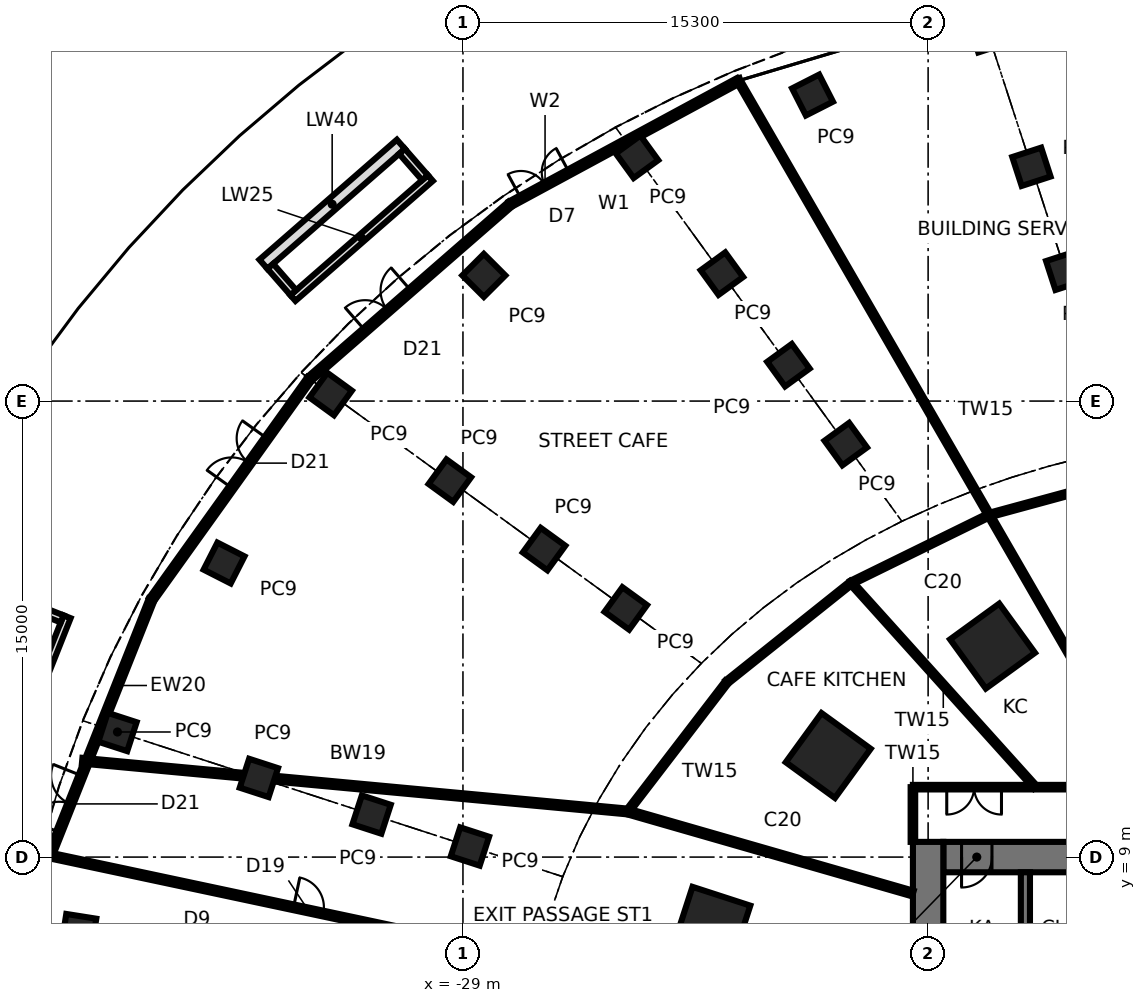
"""IFC4 building model, lengths in metres.
Left out: names, types, materials, properties, quantities, classifications, styles, units other than length and angle.
Written with IfcOpenShell. Run it as: python <this file> out.ifc"""

import sys

from ifc_helpers import new_model, si_unit, direction, frame, frame_2d, origin, origin_2d, place, context, subcontext, project, spatial, rectangle, extrude, element, fill, save


model = new_model("IFC4")
c1 = context("Model", 3, precision=1e-05, world=origin(), true_north=direction((0.0, 1.0)))
c2 = subcontext(c1, "Body", "Model", "MODEL_VIEW")
j1 = project(units=[si_unit("LENGTHUNIT", "METRE"), si_unit("PLANEANGLEUNIT", "RADIAN")], contexts=[c1])
p1 = place(None, origin())
s1 = spatial("IfcSite", under=j1, at=p1, CompositionType="ELEMENT")
p2 = place(p1, origin())
s2 = spatial("IfcBuilding", under=s1, at=p2, CompositionType="ELEMENT")
p3 = place(p2, origin())
s3 = spatial("IfcBuildingStorey", under=s2, at=p3, CompositionType="ELEMENT", Elevation=0.0)
for number, where, z_axis, x_axis in (
    (1, (-11.581, 15.94, 0.0), (0.0, 0.0, 1.0), (-0.588, 0.809, 0.0)),
    (2, (-16.986, 12.341, 0.0), (0.0, 0.0, 1.0), (-0.809, 0.588, 0.0)),
    (3, (-20.808, 6.761, 0.0), (0.0, 0.0, 1.0), (-0.951, 0.309, 0.0)),
):
    element("IfcColumn", number, at=place(p3, frame(where, z_axis=z_axis, x_axis=x_axis)), inside=s3, PredefinedType="COLUMN", context=c2, shape_type="SweptSolid", body=[
        extrude(rectangle(XDim=2.0, YDim=2.0, at=origin_2d()), origin(), (0.0, 0.0, 1.0), 5.6),
    ])
for number, where, z_axis, x_axis in (
    (4, (-11.729, 36.097, 0.0), (0.0, 0.0, 1.0), (-0.309, 0.951, 0.0)),
    (5, (-17.502, 34.066, 0.0), (0.0, 0.0, 1.0), (-0.454, 0.891, 0.0)),
    (6, (-23.275, 32.035, 0.0), (0.0, 0.0, 1.0), (-0.588, 0.809, 0.0)),
    (7, (-28.313, 28.133, 0.0), (0.0, 0.0, 1.0), (-0.707, 0.707, 0.0)),
    (8, (-33.352, 24.232, 0.0), (0.0, 0.0, 1.0), (-0.809, 0.588, 0.0)),
    (9, (-36.858, 18.673, 0.0), (0.0, 0.0, 1.0), (-0.891, 0.454, 0.0)),
    (10, (-40.363, 13.115, 0.0), (0.0, 0.0, 1.0), (-0.951, 0.309, 0.0)),
    (11, (-41.632, 6.557, 0.0), (0.0, 0.0, 1.0), (-0.988, 0.156, 0.0)),
    (12, (-10.302, 31.706, 0.0), (0.0, 0.0, 1.0), (-0.309, 0.951, 0.0)),
    (13, (-20.483, 28.192, 0.0), (0.0, 0.0, 1.0), (-0.588, 0.809, 0.0)),
    (14, (-29.431, 21.383, 0.0), (0.0, 0.0, 1.0), (-0.809, 0.588, 0.0)),
    (15, (-35.712, 11.604, 0.0), (0.0, 0.0, 1.0), (-0.951, 0.309, 0.0)),
    (16, (-9.19, 28.285, 0.0), (0.0, 0.0, 1.0), (-0.309, 0.951, 0.0)),
    (17, (-18.294, 25.18, 0.0), (0.0, 0.0, 1.0), (-0.588, 0.809, 0.0)),
    (18, (-26.332, 19.131, 0.0), (0.0, 0.0, 1.0), (-0.809, 0.588, 0.0)),
    (19, (-32.005, 10.399, 0.0), (0.0, 0.0, 1.0), (-0.951, 0.309, 0.0)),
    (20, (-16.409, 22.584, 0.0), (0.0, 0.0, 1.0), (-0.588, 0.809, 0.0)),
    (21, (-23.645, 17.179, 0.0), (0.0, 0.0, 1.0), (-0.809, 0.588, 0.0)),
    (22, (-28.77, 9.348, 0.0), (0.0, 0.0, 1.0), (-0.951, 0.309, 0.0)),
):
    element("IfcColumn", number, at=place(p3, frame(where, z_axis=z_axis, x_axis=x_axis)), inside=s3, PredefinedType="COLUMN", context=c2, shape_type="SweptSolid", body=[
        extrude(rectangle(XDim=1.0, YDim=1.0, at=origin_2d()), origin(), (0.0, 0.0, 1.0), 5.6),
    ])
p4 = place(p3, frame((13.2, 9.0, 0.0), z_axis=(0.0, 0.0, 1.0), x_axis=(-1.0, 0.0, 0.0)))
e23 = element("IfcWall", 23, at=p4, inside=s3, PredefinedType="SHEAR", context=c2, shape_type="SweptSolid", body=[
    extrude(rectangle(XDim=26.4, YDim=1.0, at=frame_2d((13.2, 0.0))), origin(), (0.0, 0.0, 1.0), 5.6),
])
p5 = place(p4, frame((2.65, 0.0, 0.0)))
e24 = element("IfcOpeningElement", 24, at=p5, cuts=e23, PredefinedType="OPENING", context=c2, shape_type="SweptSolid", body=[
    extrude(rectangle(XDim=0.9, YDim=2.1, at=frame_2d((0.45, 1.05))), frame((0.0, 0.51, 0.0), z_axis=(0.0, -1.0, 0.0), x_axis=(1.0, 0.0, 0.0)), (0.0, 0.0, 1.0), 1.02),
])
p6 = place(p4, frame((9.5, 0.0, 0.0)))
e25 = element("IfcOpeningElement", 25, at=p6, cuts=e23, PredefinedType="OPENING", context=c2, shape_type="SweptSolid", body=[
    extrude(rectangle(XDim=0.9, YDim=2.1, at=frame_2d((0.45, 1.05))), frame((0.0, 0.51, 0.0), z_axis=(0.0, -1.0, 0.0), x_axis=(1.0, 0.0, 0.0)), (0.0, 0.0, 1.0), 1.02),
])
p7 = place(p4, frame((16.0, 0.0, 0.0)))
e26 = element("IfcOpeningElement", 26, at=p7, cuts=e23, PredefinedType="OPENING", context=c2, shape_type="SweptSolid", body=[
    extrude(rectangle(XDim=0.9, YDim=2.1, at=frame_2d((0.45, 1.05))), frame((0.0, 0.51, 0.0), z_axis=(0.0, -1.0, 0.0), x_axis=(1.0, 0.0, 0.0)), (0.0, 0.0, 1.0), 1.02),
])
p8 = place(p4, frame((21.25, 0.0, 0.0)))
e27 = element("IfcOpeningElement", 27, at=p8, cuts=e23, PredefinedType="OPENING", context=c2, shape_type="SweptSolid", body=[
    extrude(rectangle(XDim=0.9, YDim=2.1, at=frame_2d((0.45, 1.05))), frame((0.0, 0.51, 0.0), z_axis=(0.0, -1.0, 0.0), x_axis=(1.0, 0.0, 0.0)), (0.0, 0.0, 1.0), 1.02),
])
p9 = place(p4, frame((24.8, 0.0, 0.0)))
e28 = element("IfcOpeningElement", 28, at=p9, cuts=e23, PredefinedType="OPENING", context=c2, shape_type="SweptSolid", body=[
    extrude(rectangle(XDim=1.0, YDim=2.1, at=frame_2d((0.5, 1.05))), frame((0.0, 0.51, 0.0), z_axis=(0.0, -1.0, 0.0), x_axis=(1.0, 0.0, 0.0)), (0.0, 0.0, 1.0), 1.02),
])
p10 = place(p3, frame((-13.7, 9.5, 0.0), z_axis=(0.0, 0.0, 1.0), x_axis=(0.0, -1.0, 0.0)))
e29 = element("IfcWall", 29, at=p10, inside=s3, PredefinedType="SHEAR", context=c2, shape_type="SweptSolid", body=[
    extrude(rectangle(XDim=19.0, YDim=1.0, at=frame_2d((9.5, 0.0))), origin(), (0.0, 0.0, 1.0), 5.6),
])
p11 = place(p10, frame((8.6, 0.0, 0.0)))
e30 = element("IfcOpeningElement", 30, at=p11, cuts=e29, PredefinedType="OPENING", context=c2, shape_type="SweptSolid", body=[
    extrude(rectangle(XDim=1.8, YDim=2.4, at=frame_2d((0.9, 1.2))), frame((0.0, 0.51, 0.0), z_axis=(0.0, -1.0, 0.0), x_axis=(1.0, 0.0, 0.0)), (0.0, 0.0, 1.0), 1.02),
])
p12 = place(p10, frame((5.3, 0.0, 0.0)))
e31 = element("IfcOpeningElement", 31, at=p12, cuts=e29, PredefinedType="OPENING", context=c2, shape_type="SweptSolid", body=[
    extrude(rectangle(XDim=1.0, YDim=2.1, at=frame_2d((0.5, 1.05))), frame((0.0, 0.51, 0.0), z_axis=(0.0, -1.0, 0.0), x_axis=(1.0, 0.0, 0.0)), (0.0, 0.0, 1.0), 1.02),
])
p13 = place(p3, frame((-10.5, 4.75, 0.0), z_axis=(0.0, 0.0, 1.0), x_axis=(0.0, 1.0, 0.0)))
e32 = element("IfcWall", 32, at=p13, inside=s3, PredefinedType="SHEAR", context=c2, shape_type="SweptSolid", body=[
    extrude(rectangle(XDim=3.75, YDim=0.3, at=frame_2d((1.875, 0.0))), origin(), (0.0, 0.0, 1.0), 5.6),
])
p14 = place(p3, frame((-19.94, 34.537, 0.0), z_axis=(0.0, 0.0, 1.0), x_axis=(-0.879579965321, -0.475751074204, 0.0)))
e33 = element("IfcWall", 33, at=p14, inside=s3, PredefinedType="SOLIDWALL", context=c2, shape_type="SweptSolid", body=[
    extrude(rectangle(XDim=8.531, YDim=0.2, at=frame_2d((4.265, 0.0))), origin(), (0.0, 0.0, 1.0), 5.4),
])
p15 = place(p14, frame((6.33, 0.0, 0.0)))
e34 = element("IfcOpeningElement", 34, at=p15, cuts=e33, PredefinedType="OPENING", context=c2, shape_type="SweptSolid", body=[
    extrude(rectangle(XDim=1.8, YDim=2.7, at=frame_2d((0.9, 1.35))), frame((0.0, 0.11, 0.0), z_axis=(0.0, -1.0, 0.0), x_axis=(1.0, 0.0, 0.0)), (0.0, 0.0, 1.0), 0.22),
])
p16 = place(p14, frame((4.93, 0.0, 0.3)))
e35 = element("IfcOpeningElement", 35, at=p16, cuts=e33, PredefinedType="OPENING", context=c2, shape_type="SweptSolid", body=[
    extrude(rectangle(XDim=1.2, YDim=2.4, at=frame_2d((0.6, 1.2))), frame((0.0, 0.11, 0.0), z_axis=(0.0, -1.0, 0.0), x_axis=(1.0, 0.0, 0.0)), (0.0, 0.0, 1.0), 0.22),
])
p17 = place(p14, frame((6.33, 0.0, 3.0)))
e36 = element("IfcOpeningElement", 36, at=p17, cuts=e33, PredefinedType="OPENING", context=c2, shape_type="SweptSolid", body=[
    extrude(rectangle(XDim=1.8, YDim=0.9, at=frame_2d((0.9, 0.45))), frame((0.0, 0.11, 0.0), z_axis=(0.0, -1.0, 0.0), x_axis=(1.0, 0.0, 0.0)), (0.0, 0.0, 1.0), 0.22),
])
p18 = place(p3, frame((-27.443, 30.479, 0.0), z_axis=(0.0, 0.0, 1.0), x_axis=(-0.753966562676, -0.656912796623, 0.0)))
e37 = element("IfcWall", 37, at=p18, inside=s3, PredefinedType="SOLIDWALL", context=c2, shape_type="SweptSolid", body=[
    extrude(rectangle(XDim=8.749, YDim=0.2, at=frame_2d((4.375, 0.0))), origin(), (0.0, 0.0, 1.0), 5.4),
])
p19 = place(p18, frame((4.333, 0.0, 0.0)))
e38 = element("IfcOpeningElement", 38, at=p19, cuts=e37, PredefinedType="OPENING", context=c2, shape_type="SweptSolid", body=[
    extrude(rectangle(XDim=2.0, YDim=2.7, at=frame_2d((1.0, 1.35))), frame((0.0, 0.11, 0.0), z_axis=(0.0, -1.0, 0.0), x_axis=(1.0, 0.0, 0.0)), (0.0, 0.0, 1.0), 0.22),
])
p20 = place(p3, frame((-34.04, 24.731, 0.0), z_axis=(0.0, 0.0, 1.0), x_axis=(-0.582334103946, -0.81294956263, 0.0)))
e39 = element("IfcWall", 39, at=p20, inside=s3, PredefinedType="SOLIDWALL", context=c2, shape_type="SweptSolid", body=[
    extrude(rectangle(XDim=8.931, YDim=0.2, at=frame_2d((4.465, 0.0))), origin(), (0.0, 0.0, 1.0), 5.4),
])
p21 = place(p20, frame((2.41, 0.0, 0.0)))
e40 = element("IfcOpeningElement", 40, at=p21, cuts=e39, PredefinedType="OPENING", context=c2, shape_type="SweptSolid", body=[
    extrude(rectangle(XDim=2.0, YDim=2.7, at=frame_2d((1.0, 1.35))), frame((0.0, 0.11, 0.0), z_axis=(0.0, -1.0, 0.0), x_axis=(1.0, 0.0, 0.0)), (0.0, 0.0, 1.0), 0.22),
])
p22 = place(p3, frame((-39.24, 17.471, 0.0), z_axis=(0.0, 0.0, 1.0), x_axis=(-0.369754749145, -0.929129391143, 0.0)))
e41 = element("IfcWall", 41, at=p22, inside=s3, PredefinedType="SOLIDWALL", context=c2, shape_type="SweptSolid", body=[
    extrude(rectangle(XDim=9.06, YDim=0.2, at=frame_2d((4.53, 0.0))), origin(), (0.0, 0.0, 1.0), 5.4),
])
p23 = place(p22, frame((6.235, 0.0, 0.0)))
e42 = element("IfcOpeningElement", 42, at=p23, cuts=e41, PredefinedType="OPENING", context=c2, shape_type="SweptSolid", body=[
    extrude(rectangle(XDim=2.0, YDim=2.7, at=frame_2d((1.0, 1.35))), frame((0.0, 0.11, 0.0), z_axis=(0.0, -1.0, 0.0), x_axis=(1.0, 0.0, 0.0)), (0.0, 0.0, 1.0), 0.22),
])
p24 = place(p3, frame((-30.072, 31.336, -0.15), z_axis=(0.0, 0.0, 1.0), x_axis=(-0.753337421731, -0.657634190884, 0.0)))
e43 = element("IfcWall", 43, at=p24, inside=s3, PredefinedType="SOLIDWALL", context=c2, shape_type="SweptSolid", body=[
    extrude(rectangle(XDim=6.0, YDim=0.25, at=frame_2d((3.0, 0.0))), origin(), (0.0, 0.0, 1.0), 0.6),
])
p25 = place(p3, frame((-31.042, 32.447, -0.15), z_axis=(0.0, 0.0, 1.0), x_axis=(-0.753337421731, -0.657634190884, 0.0)))
e44 = element("IfcWall", 44, at=p25, inside=s3, PredefinedType="SOLIDWALL", context=c2, shape_type="SweptSolid", body=[
    extrude(rectangle(XDim=6.0, YDim=0.4, at=frame_2d((3.0, 0.0))), origin(), (0.0, 0.0, 1.0), 0.6),
])
p26 = place(p3, frame((-30.248, 31.348, -0.15), z_axis=(0.0, 0.0, 1.0), x_axis=(-0.657617494146, 0.753351997006, 0.0)))
e45 = element("IfcWall", 45, at=p26, inside=s3, PredefinedType="SOLIDWALL", context=c2, shape_type="SweptSolid", body=[
    extrude(rectangle(XDim=1.15, YDim=0.25, at=frame_2d((0.575, 0.0))), origin(), (0.0, 0.0, 1.0), 0.6),
])
p27 = place(p3, frame((-34.58, 27.567, -0.15), z_axis=(0.0, 0.0, 1.0), x_axis=(-0.657602180016, 0.753365364772, 0.0)))
e46 = element("IfcWall", 46, at=p27, inside=s3, PredefinedType="SOLIDWALL", context=c2, shape_type="SweptSolid", body=[
    extrude(rectangle(XDim=1.15, YDim=0.25, at=frame_2d((0.575, 0.0))), origin(), (0.0, 0.0, 1.0), 0.6),
])
p28 = place(p3, frame((-42.021, 16.905, -0.15), z_axis=(0.0, 0.0, 1.0), x_axis=(-0.369263988393, -0.929324543352, 0.0)))
e47 = element("IfcWall", 47, at=p28, inside=s3, PredefinedType="SOLIDWALL", context=c2, shape_type="SweptSolid", body=[
    extrude(rectangle(XDim=6.0, YDim=0.25, at=frame_2d((3.0, 0.0))), origin(), (0.0, 0.0, 1.0), 0.6),
])
p29 = place(p3, frame((-42.183, 16.835, -0.15), z_axis=(0.0, 0.0, 1.0), x_axis=(-0.92933811404, 0.369229833291, 0.0)))
e48 = element("IfcWall", 48, at=p29, inside=s3, PredefinedType="SOLIDWALL", context=c2, shape_type="SweptSolid", body=[
    extrude(rectangle(XDim=1.15, YDim=0.25, at=frame_2d((0.575, 0.0))), origin(), (0.0, 0.0, 1.0), 0.6),
])
p30 = place(p3, frame((-6.995, 21.528, 0.0), z_axis=(0.0, 0.0, 1.0), x_axis=(-0.964877176163, -0.26270141781, 0.0)))
e49 = element("IfcWall", 49, at=p30, inside=s3, PredefinedType="PARTITIONING", context=c2, shape_type="SweptSolid", body=[
    extrude(rectangle(XDim=4.867, YDim=0.15, at=frame_2d((2.434, 0.0))), origin(), (0.0, 0.0, 1.0), 5.4),
])
p31 = place(p3, frame((-6.524, 11.3, 0.0), z_axis=(0.0, 0.0, 1.0), x_axis=(-0.499999476762, 0.866025705876, 0.0)))
e50 = element("IfcWall", 50, at=p31, inside=s3, PredefinedType="PARTITIONING", context=c2, shape_type="SweptSolid", body=[
    extrude(rectangle(XDim=26.751, YDim=0.15, at=frame_2d((13.376, 0.0))), origin(), (0.0, 0.0, 1.0), 5.4),
])
p32 = place(p3, frame((-1.992, 11.3, 0.0), z_axis=(0.0, 0.0, 1.0), x_axis=(-1.0, 0.0, 0.0)))
e51 = element("IfcWall", 51, at=p32, inside=s3, PredefinedType="PARTITIONING", context=c2, shape_type="SweptSolid", body=[
    extrude(rectangle(XDim=12.208, YDim=0.15, at=frame_2d((6.104, 0.0))), origin(), (0.0, 0.0, 1.0), 5.4),
])
p33 = place(p32, frame((5.782, 0.0, 0.0)))
e52 = element("IfcOpeningElement", 52, at=p33, cuts=e51, PredefinedType="OPENING", context=c2, shape_type="SweptSolid", body=[
    extrude(rectangle(XDim=1.2, YDim=2.4, at=frame_2d((0.6, 1.2))), frame((0.0, 0.085, 0.0), z_axis=(0.0, -1.0, 0.0), x_axis=(1.0, 0.0, 0.0)), (0.0, 0.0, 1.0), 0.17),
])
p34 = place(p32, frame((9.295, 0.0, 0.0)))
e53 = element("IfcOpeningElement", 53, at=p34, cuts=e51, PredefinedType="OPENING", context=c2, shape_type="SweptSolid", body=[
    extrude(rectangle(XDim=1.8, YDim=2.4, at=frame_2d((0.9, 1.2))), frame((0.0, 0.085, 0.0), z_axis=(0.0, -1.0, 0.0), x_axis=(1.0, 0.0, 0.0)), (0.0, 0.0, 1.0), 0.17),
])
p35 = place(p3, frame((-11.691, 20.25, 0.0), z_axis=(0.0, 0.0, 1.0), x_axis=(-0.897697488604, -0.440612322744, 0.0)))
e54 = element("IfcWall", 54, at=p35, inside=s3, PredefinedType="PARTITIONING", context=c2, shape_type="SweptSolid", body=[
    extrude(rectangle(XDim=5.054, YDim=0.15, at=frame_2d((2.527, 0.0))), origin(), (0.0, 0.0, 1.0), 5.4),
])
p36 = place(p3, frame((-10.175, 11.3, 0.0), z_axis=(0.0, 0.0, 1.0), x_axis=(-0.669137674556, 0.743138461183, 0.0)))
e55 = element("IfcWall", 55, at=p36, inside=s3, PredefinedType="PARTITIONING", context=c2, shape_type="SweptSolid", body=[
    extrude(rectangle(XDim=9.046, YDim=0.15, at=frame_2d((4.523, 0.0))), origin(), (0.0, 0.0, 1.0), 5.4),
])
p37 = place(p3, frame((-16.228, 18.023, 0.0), z_axis=(0.0, 0.0, 1.0), x_axis=(-0.781542390833, -0.623852138997, 0.0)))
e56 = element("IfcWall", 56, at=p37, inside=s3, PredefinedType="PARTITIONING", context=c2, shape_type="SweptSolid", body=[
    extrude(rectangle(XDim=5.23, YDim=0.15, at=frame_2d((2.615, 0.0))), origin(), (0.0, 0.0, 1.0), 5.4),
])
p38 = place(p3, frame((-14.2, 11.3, 0.0), z_axis=(0.0, 0.0, 1.0), x_axis=(0.0, -1.0, 0.0)))
e57 = element("IfcWall", 57, at=p38, inside=s3, PredefinedType="PARTITIONING", context=c2, shape_type="SweptSolid", body=[
    extrude(rectangle(XDim=1.8, YDim=0.15, at=frame_2d((0.9, 0.0))), origin(), (0.0, 0.0, 1.0), 5.4),
])
p39 = place(p3, frame((-20.315, 14.76, 0.0), z_axis=(0.0, 0.0, 1.0), x_axis=(-0.608593816375, -0.793481925862, 0.0)))
e58 = element("IfcWall", 58, at=p39, inside=s3, PredefinedType="PARTITIONING", context=c2, shape_type="SweptSolid", body=[
    extrude(rectangle(XDim=5.369, YDim=0.15, at=frame_2d((2.685, 0.0))), origin(), (0.0, 0.0, 1.0), 5.4),
])
p40 = place(p3, frame((-14.2, 7.8, 0.0), z_axis=(0.0, 0.0, 1.0), x_axis=(-0.961010848489, 0.27651066722, 0.0)))
e59 = element("IfcWall", 59, at=p40, inside=s3, PredefinedType="SOLIDWALL", context=c2, shape_type="SweptSolid", body=[
    extrude(rectangle(XDim=9.763, YDim=0.19, at=frame_2d((4.882, 0.0))), origin(), (0.0, 0.0, 1.0), 5.4),
])
p41 = place(p3, frame((-23.583, 10.5, 0.0), z_axis=(0.0, 0.0, 1.0), x_axis=(-0.995692930354, 0.092712396381, 0.0)))
e60 = element("IfcWall", 60, at=p41, inside=s3, PredefinedType="SOLIDWALL", context=c2, shape_type="SweptSolid", body=[
    extrude(rectangle(XDim=18.02, YDim=0.19, at=frame_2d((9.01, 0.0))), origin(), (0.0, 0.0, 1.0), 4.45),
])
p42 = place(p3, frame((-42.512, 9.036, 0.0), z_axis=(0.0, 0.0, 1.0), x_axis=(0.978148538657, -0.207907278186, 0.0)))
e61 = element("IfcWall", 61, at=p42, inside=s3, PredefinedType="SOLIDWALL", context=c2, shape_type="SweptSolid", body=[
    extrude(rectangle(XDim=28.945, YDim=0.19, at=frame_2d((14.472, 0.0))), origin(), (0.0, 0.0, 1.0), 5.4),
])
p43 = place(p42, frame((8.116, 0.0, 0.0)))
e62 = element("IfcOpeningElement", 62, at=p43, cuts=e61, PredefinedType="OPENING", context=c2, shape_type="SweptSolid", body=[
    extrude(rectangle(XDim=1.0, YDim=2.1, at=frame_2d((0.5, 1.05))), frame((0.0, 0.105, 0.0), z_axis=(0.0, -1.0, 0.0), x_axis=(1.0, 0.0, 0.0)), (0.0, 0.0, 1.0), 0.21),
])
p44 = place(p15, frame((1.8, 0.0, 0.0), z_axis=(0.0, 0.0, 1.0), x_axis=(-1.0, 0.0, 0.0)))
e63 = element("IfcDoor", 63, at=p44, inside=s3, OperationType="DOUBLE_DOOR_SINGLE_SWING", PredefinedType="DOOR", context=c2, shape_type="SweptSolid", body=[
    extrude(rectangle(XDim=1.8, YDim=2.7, at=frame_2d((0.9, 1.35))), frame((0.0, 0.025, 0.0), z_axis=(0.0, -1.0, 0.0), x_axis=(1.0, 0.0, 0.0)), (0.0, 0.0, 1.0), 0.05),
])
fill(e34, e63)
p45 = place(p16, origin())
e64 = element("IfcWindow", 64, at=p45, inside=s3, PartitioningType="SINGLE_PANEL", PredefinedType="WINDOW", context=c2, shape_type="SweptSolid", body=[
    extrude(rectangle(XDim=1.2, YDim=2.4, at=frame_2d((0.6, 1.2))), frame((0.0, 0.03, 0.0), z_axis=(0.0, -1.0, 0.0), x_axis=(1.0, 0.0, 0.0)), (0.0, 0.0, 1.0), 0.06),
])
fill(e35, e64)
p46 = place(p17, origin())
e65 = element("IfcWindow", 65, at=p46, inside=s3, PartitioningType="SINGLE_PANEL", PredefinedType="WINDOW", context=c2, shape_type="SweptSolid", body=[
    extrude(rectangle(XDim=1.8, YDim=0.9, at=frame_2d((0.9, 0.45))), frame((0.0, 0.03, 0.0), z_axis=(0.0, -1.0, 0.0), x_axis=(1.0, 0.0, 0.0)), (0.0, 0.0, 1.0), 0.06),
])
fill(e36, e65)
p47 = place(p19, frame((2.0, 0.0, 0.0), z_axis=(0.0, 0.0, 1.0), x_axis=(-1.0, 0.0, 0.0)))
e66 = element("IfcDoor", 66, at=p47, inside=s3, OperationType="DOUBLE_DOOR_SINGLE_SWING", PredefinedType="DOOR", context=c2, shape_type="SweptSolid", body=[
    extrude(rectangle(XDim=2.0, YDim=2.7, at=frame_2d((1.0, 1.35))), frame((0.0, 0.025, 0.0), z_axis=(0.0, -1.0, 0.0), x_axis=(1.0, 0.0, 0.0)), (0.0, 0.0, 1.0), 0.05),
])
fill(e38, e66)
p48 = place(p21, frame((2.0, 0.0, 0.0), z_axis=(0.0, 0.0, 1.0), x_axis=(-1.0, 0.0, 0.0)))
e67 = element("IfcDoor", 67, at=p48, inside=s3, OperationType="DOUBLE_DOOR_SINGLE_SWING", PredefinedType="DOOR", context=c2, shape_type="SweptSolid", body=[
    extrude(rectangle(XDim=2.0, YDim=2.7, at=frame_2d((1.0, 1.35))), frame((0.0, 0.025, 0.0), z_axis=(0.0, -1.0, 0.0), x_axis=(1.0, 0.0, 0.0)), (0.0, 0.0, 1.0), 0.05),
])
fill(e40, e67)
p49 = place(p23, frame((2.0, 0.0, 0.0), z_axis=(0.0, 0.0, 1.0), x_axis=(-1.0, 0.0, 0.0)))
e68 = element("IfcDoor", 68, at=p49, inside=s3, OperationType="DOUBLE_DOOR_SINGLE_SWING", PredefinedType="DOOR", context=c2, shape_type="SweptSolid", body=[
    extrude(rectangle(XDim=2.0, YDim=2.7, at=frame_2d((1.0, 1.35))), frame((0.0, 0.025, 0.0), z_axis=(0.0, -1.0, 0.0), x_axis=(1.0, 0.0, 0.0)), (0.0, 0.0, 1.0), 0.05),
])
fill(e42, e68)
p50 = place(p9, origin())
e69 = element("IfcDoor", 69, at=p50, inside=s3, OperationType="SINGLE_SWING_RIGHT", PredefinedType="DOOR", context=c2, shape_type="SweptSolid", body=[
    extrude(rectangle(XDim=0.92, YDim=2.06, at=frame_2d((0.5, 1.03))), frame((0.0, 0.025, 0.0), z_axis=(0.0, -1.0, 0.0), x_axis=(1.0, 0.0, 0.0)), (0.0, 0.0, 1.0), 0.05),
    extrude(rectangle(XDim=0.04, YDim=2.1, at=frame_2d((0.02, 1.05))), frame((0.0, 0.25, 0.0), z_axis=(0.0, -1.0, 0.0), x_axis=(1.0, 0.0, 0.0)), (0.0, 0.0, 1.0), 0.5),
    extrude(rectangle(XDim=0.04, YDim=2.1, at=frame_2d((0.98, 1.05))), frame((0.0, 0.25, 0.0), z_axis=(0.0, -1.0, 0.0), x_axis=(1.0, 0.0, 0.0)), (0.0, 0.0, 1.0), 0.5),
    extrude(rectangle(XDim=0.92, YDim=0.04, at=frame_2d((0.5, 2.08))), frame((0.0, 0.25, 0.0), z_axis=(0.0, -1.0, 0.0), x_axis=(1.0, 0.0, 0.0)), (0.0, 0.0, 1.0), 0.5),
])
fill(e28, e69)
p51 = place(p34, origin())
e70 = element("IfcDoor", 70, at=p51, inside=s3, OperationType="DOUBLE_DOOR_SINGLE_SWING", PredefinedType="DOOR", context=c2, shape_type="SweptSolid", body=[
    extrude(rectangle(XDim=1.8, YDim=2.4, at=frame_2d((0.9, 1.2))), frame((0.0, 0.025, 0.0), z_axis=(0.0, -1.0, 0.0), x_axis=(1.0, 0.0, 0.0)), (0.0, 0.0, 1.0), 0.05),
])
fill(e53, e70)
p52 = place(p43, origin())
e71 = element("IfcDoor", 71, at=p52, inside=s3, OperationType="SINGLE_SWING_LEFT", PredefinedType="DOOR", context=c2, shape_type="SweptSolid", body=[
    extrude(rectangle(XDim=1.0, YDim=2.1, at=frame_2d((0.5, 1.05))), frame((0.0, 0.025, 0.0), z_axis=(0.0, -1.0, 0.0), x_axis=(1.0, 0.0, 0.0)), (0.0, 0.0, 1.0), 0.05),
])
fill(e62, e71)
save(model, sys.argv[1])
